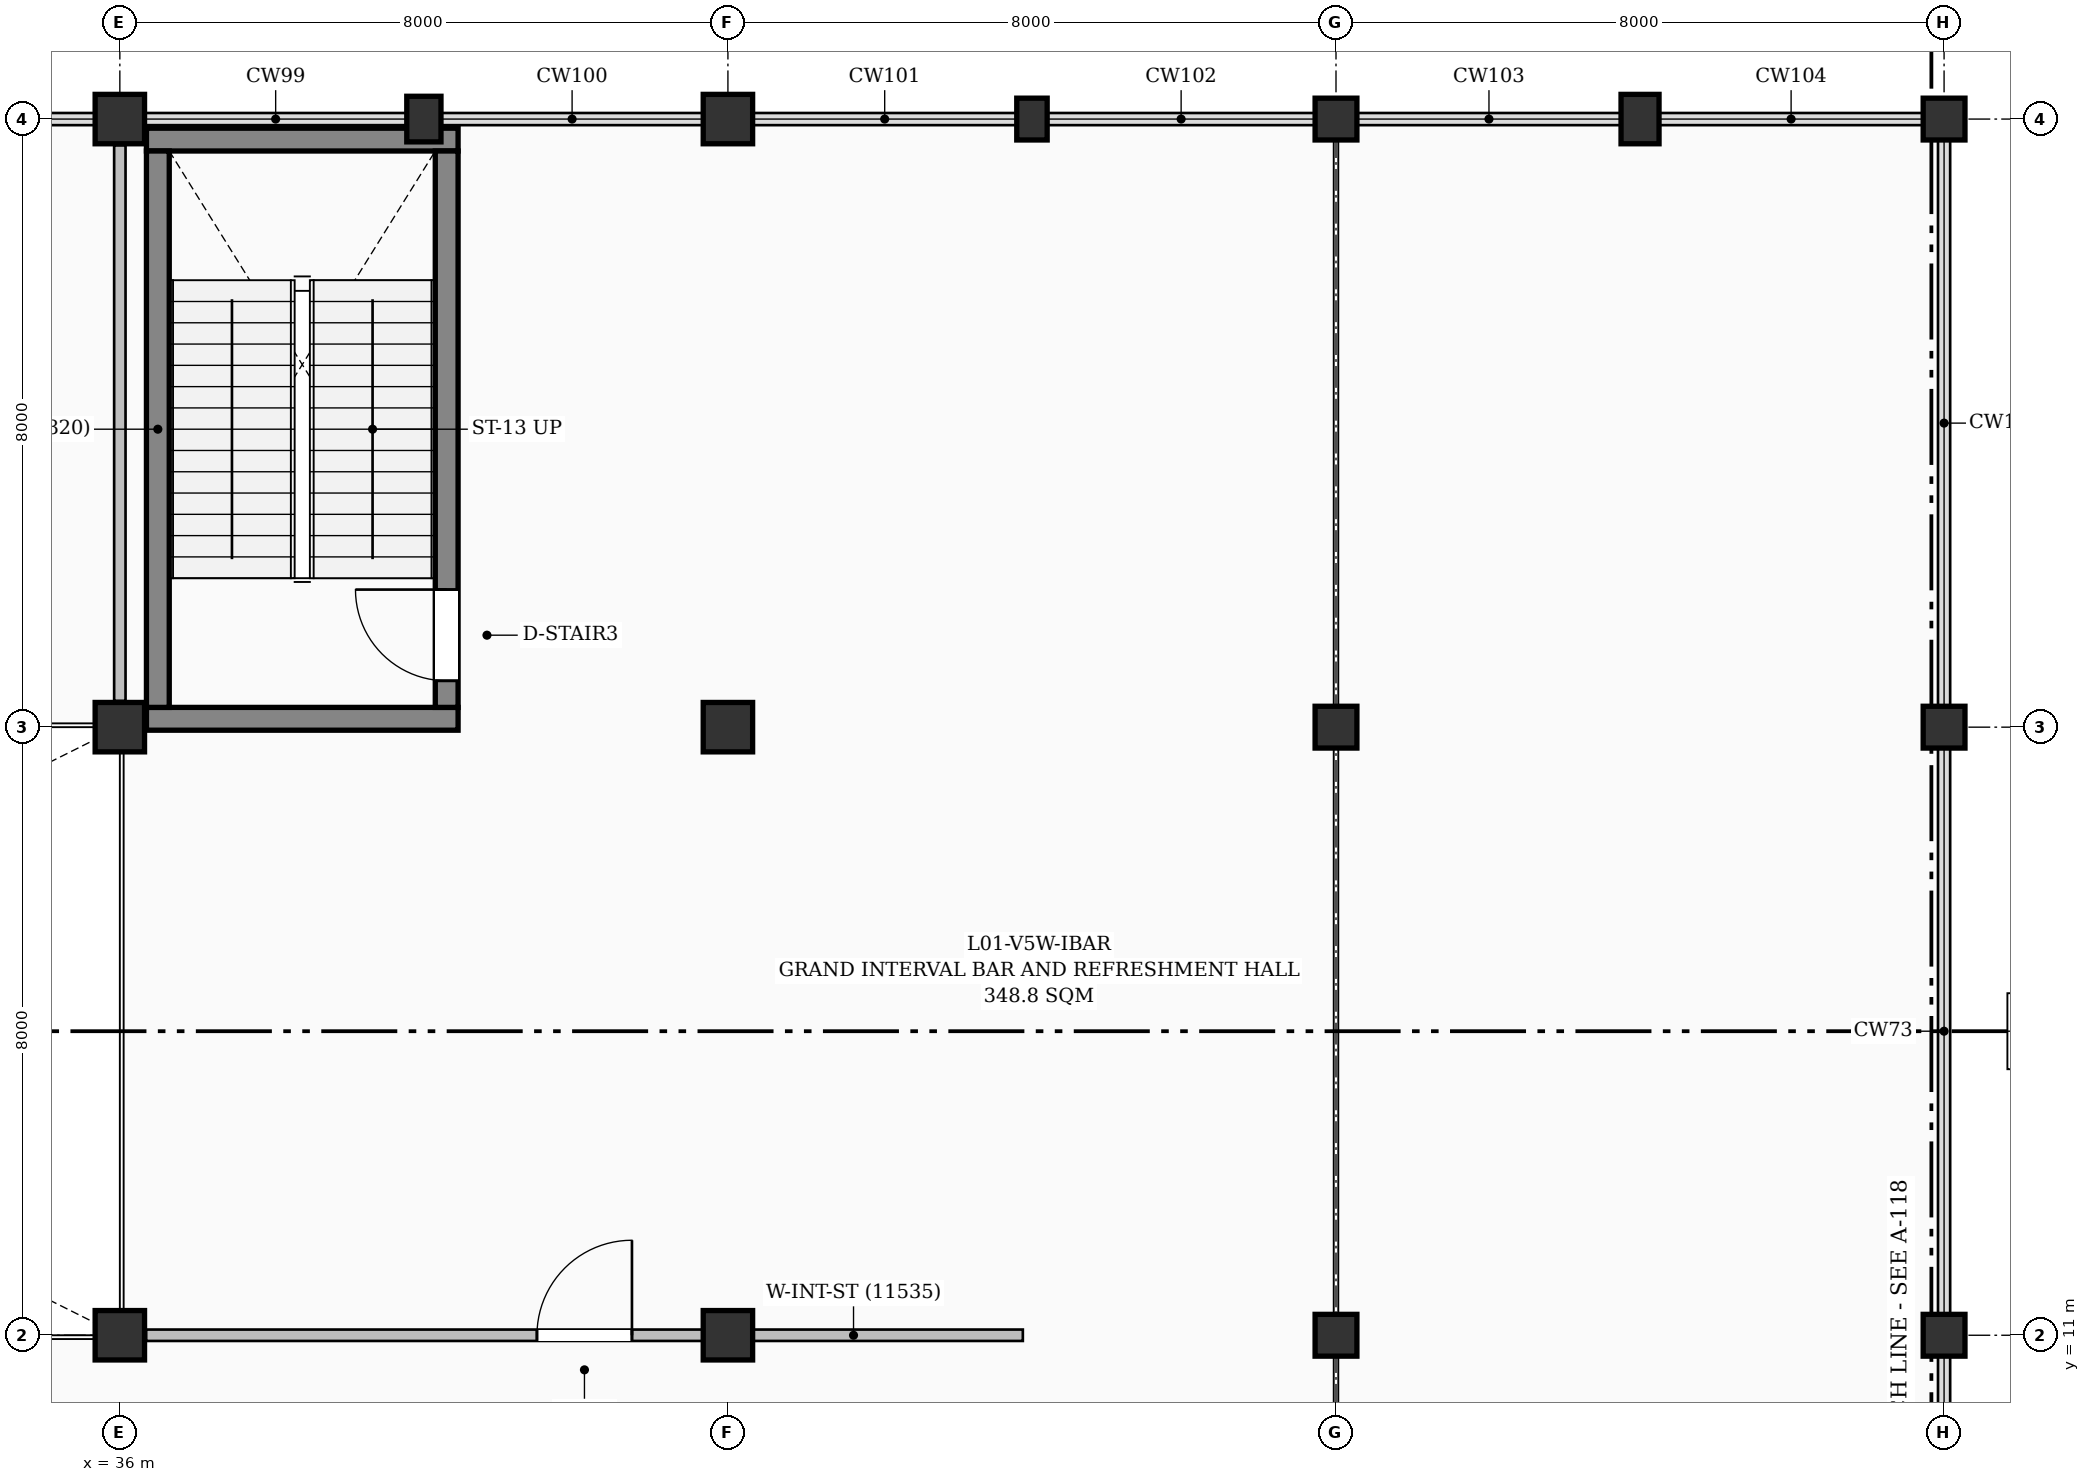
"""IFC4 building model, lengths in metres.
Left out: names, types, materials, properties, quantities, classifications, styles, units other than length and angle.
Written with IfcOpenShell. Run it as: python <this file> out.ifc"""

import sys

from ifc_helpers import new_model, si_unit, direction, frame, frame_2d, origin, origin_2d, place, context, subcontext, project, spatial, rectangle, extrude, element, fill, save


model = new_model("IFC4")
c1 = context("Model", 3, precision=1e-05, world=origin(), true_north=direction((0.0, 1.0)))
c2 = subcontext(c1, "Body", "Model", "MODEL_VIEW")
j1 = project(units=[si_unit("LENGTHUNIT", "METRE"), si_unit("PLANEANGLEUNIT", "RADIAN")], contexts=[c1])
p1 = place(None, origin())
s1 = spatial("IfcSite", under=j1, at=p1, CompositionType="ELEMENT")
p2 = place(p1, origin())
s2 = spatial("IfcBuilding", under=s1, at=p2, CompositionType="ELEMENT")
p3 = place(p2, frame((0.0, 0.0, 4.8)))
s3 = spatial("IfcBuildingStorey", under=s2, at=p3, CompositionType="ELEMENT", Elevation=4.8)
for number, where, z_axis, x_axis in (
    (1, (36.0, 11.0, 0.0), (0.0, 0.0, 1.0), (1.0, 0.0, 0.0)),
    (2, (36.0, 19.0, 0.0), (0.0, 0.0, 1.0), (1.0, 0.0, 0.0)),
    (3, (36.0, 27.0, 0.0), (0.0, 0.0, 1.0), (1.0, 0.0, 0.0)),
):
    element("IfcColumn", number, at=place(p3, frame(where, z_axis=z_axis, x_axis=x_axis)), inside=s3, PredefinedType="COLUMN", context=c2, shape_type="SweptSolid", body=[
        extrude(rectangle(XDim=0.65, YDim=0.65, at=origin_2d()), origin(), (0.0, 0.0, 1.0), 4.5),
    ])
p4 = place(p3, frame((40.0, 27.0, 0.0), z_axis=(0.0, 0.0, 1.0), x_axis=(1.0, 0.0, 0.0)))
e4 = element("IfcColumn", 4, at=p4, inside=s3, PredefinedType="PILASTER", context=c2, shape_type="SweptSolid", body=[
    extrude(rectangle(XDim=0.45, YDim=0.6, at=origin_2d()), origin(), (0.0, 0.0, 1.0), 4.5),
])
for number, where, z_axis, x_axis in (
    (5, (44.0, 11.0, 0.0), (0.0, 0.0, 1.0), (1.0, 0.0, 0.0)),
    (6, (44.0, 19.0, 0.0), (0.0, 0.0, 1.0), (1.0, 0.0, 0.0)),
    (7, (44.0, 27.0, 0.0), (0.0, 0.0, 1.0), (1.0, 0.0, 0.0)),
):
    element("IfcColumn", number, at=place(p3, frame(where, z_axis=z_axis, x_axis=x_axis)), inside=s3, PredefinedType="COLUMN", context=c2, shape_type="SweptSolid", body=[
        extrude(rectangle(XDim=0.65, YDim=0.65, at=origin_2d()), origin(), (0.0, 0.0, 1.0), 4.5),
    ])
p5 = place(p3, frame((48.0, 27.0, 0.0), z_axis=(0.0, 0.0, 1.0), x_axis=(1.0, 0.0, 0.0)))
e8 = element("IfcColumn", 8, at=p5, inside=s3, PredefinedType="PILASTER", context=c2, shape_type="SweptSolid", body=[
    extrude(rectangle(XDim=0.4, YDim=0.55, at=origin_2d()), origin(), (0.0, 0.0, 1.0), 4.5),
])
for number, where, z_axis, x_axis in (
    (9, (52.0, 11.0, 0.0), (0.0, 0.0, 1.0), (1.0, 0.0, 0.0)),
    (10, (52.0, 19.0, 0.0), (0.0, 0.0, 1.0), (1.0, 0.0, 0.0)),
    (11, (52.0, 27.0, 0.0), (0.0, 0.0, 1.0), (1.0, 0.0, 0.0)),
):
    element("IfcColumn", number, at=place(p3, frame(where, z_axis=z_axis, x_axis=x_axis)), inside=s3, PredefinedType="COLUMN", context=c2, shape_type="SweptSolid", body=[
        extrude(rectangle(XDim=0.55, YDim=0.55, at=origin_2d()), origin(), (0.0, 0.0, 1.0), 4.5),
    ])
p6 = place(p3, frame((56.0, 27.0, 0.0), z_axis=(0.0, 0.0, 1.0), x_axis=(1.0, 0.0, 0.0)))
e12 = element("IfcColumn", 12, at=p6, inside=s3, PredefinedType="PILASTER", context=c2, shape_type="SweptSolid", body=[
    extrude(rectangle(XDim=0.5, YDim=0.65, at=origin_2d()), origin(), (0.0, 0.0, 1.0), 4.5),
])
for number, where, z_axis, x_axis in (
    (13, (60.0, 11.0, 0.0), (0.0, 0.0, 1.0), (1.0, 0.0, 0.0)),
    (14, (60.0, 19.0, 0.0), (0.0, 0.0, 1.0), (1.0, 0.0, 0.0)),
    (15, (60.0, 27.0, 0.0), (0.0, 0.0, 1.0), (1.0, 0.0, 0.0)),
):
    element("IfcColumn", number, at=place(p3, frame(where, z_axis=z_axis, x_axis=x_axis)), inside=s3, PredefinedType="COLUMN", context=c2, shape_type="SweptSolid", body=[
        extrude(rectangle(XDim=0.55, YDim=0.55, at=origin_2d()), origin(), (0.0, 0.0, 1.0), 4.5),
    ])
for number, where, z_axis, x_axis in (
    (16, (36.35, 19.11, 0.0), (0.0, 0.0, 1.0), (1.0, 0.0, 0.0)),
    (17, (40.45, 26.73, 0.0), (0.0, 0.0, 1.0), (-1.0, 0.0, 0.0)),
):
    element("IfcWall", number, at=place(p3, frame(where, z_axis=z_axis, x_axis=x_axis)), inside=s3, PredefinedType="SHEAR", context=c2, shape_type="SweptSolid", body=[
        extrude(rectangle(XDim=4.1, YDim=0.3, at=frame_2d((2.05, 0.0))), origin(), (0.0, 0.0, 1.0), 4.25),
    ])
p7 = place(p3, frame((36.5, 19.26, 0.0), z_axis=(0.0, 0.0, 1.0), x_axis=(0.0, 1.0, 0.0)))
e18 = element("IfcWall", 18, at=p7, inside=s3, PredefinedType="SHEAR", context=c2, shape_type="SweptSolid", body=[
    extrude(rectangle(XDim=7.32, YDim=0.3, at=frame_2d((3.66, 0.0))), origin(), (0.0, 0.0, 1.0), 4.25),
])
p8 = place(p3, frame((40.3, 19.26, 0.0), z_axis=(0.0, 0.0, 1.0), x_axis=(0.0, 1.0, 0.0)))
e19 = element("IfcWall", 19, at=p8, inside=s3, PredefinedType="SHEAR", context=c2, shape_type="SweptSolid", body=[
    extrude(rectangle(XDim=7.32, YDim=0.3, at=frame_2d((3.66, 0.0))), origin(), (0.0, 0.0, 1.0), 4.25),
])
p9 = place(p8, frame((0.35, 0.0, 0.0)))
e20 = element("IfcOpeningElement", 20, at=p9, cuts=e19, PredefinedType="OPENING", context=c2, shape_type="SweptSolid", body=[
    extrude(rectangle(XDim=1.2, YDim=2.15, at=frame_2d((0.6, 1.075))), frame((0.0, 0.16, 0.0), z_axis=(0.0, -1.0, 0.0), x_axis=(1.0, 0.0, 0.0)), (0.0, 0.0, 1.0), 0.32),
])
p10 = place(p3, frame((36.345, 11.0, 0.0), z_axis=(0.0, 0.0, 1.0), x_axis=(1.0, 0.0, 0.0)))
e21 = element("IfcWall", 21, at=p10, inside=s3, PredefinedType="PARTITIONING", context=c2, shape_type="SweptSolid", body=[
    extrude(rectangle(XDim=11.535, YDim=0.15, at=frame_2d((5.768, 0.0))), origin(), (0.0, 0.0, 1.0), 3.945),
])
p11 = place(p10, frame((5.143, 0.0, 0.0)))
e22 = element("IfcOpeningElement", 22, at=p11, cuts=e21, PredefinedType="OPENING", context=c2, shape_type="SweptSolid", body=[
    extrude(rectangle(XDim=1.25, YDim=2.15, at=frame_2d((0.625, 1.075))), frame((0.0, 0.085, 0.0), z_axis=(0.0, -1.0, 0.0), x_axis=(1.0, 0.0, 0.0)), (0.0, 0.0, 1.0), 0.17),
])
p12 = place(p3, frame((36.0, 19.345, 0.0), z_axis=(0.0, 0.0, 1.0), x_axis=(0.0, 1.0, 0.0)))
e23 = element("IfcWall", 23, at=p12, inside=s3, PredefinedType="PARTITIONING", context=c2, shape_type="SweptSolid", body=[
    extrude(rectangle(XDim=7.31, YDim=0.15, at=frame_2d((3.655, 0.0))), origin(), (0.0, 0.0, 1.0), 3.635),
])
p13 = place(p9, origin())
e24 = element("IfcDoor", 24, at=p13, inside=s3, OperationType="SINGLE_SWING_RIGHT", PredefinedType="DOOR", context=c2, shape_type="SweptSolid", body=[
    extrude(rectangle(XDim=1.2, YDim=2.15, at=frame_2d((0.6, 1.075))), frame((0.0, 0.025, 0.0), z_axis=(0.0, -1.0, 0.0), x_axis=(1.0, 0.0, 0.0)), (0.0, 0.0, 1.0), 0.05),
])
fill(e20, e24)
p14 = place(p11, origin())
e25 = element("IfcDoor", 25, at=p14, inside=s3, OperationType="SINGLE_SWING_RIGHT", PredefinedType="DOOR", context=c2, shape_type="SweptSolid", body=[
    extrude(rectangle(XDim=1.25, YDim=2.15, at=frame_2d((0.625, 1.075))), frame((0.0, 0.025, 0.0), z_axis=(0.0, -1.0, 0.0), x_axis=(1.0, 0.0, 0.0)), (0.0, 0.0, 1.0), 0.05),
])
fill(e22, e25)
save(model, sys.argv[1])
